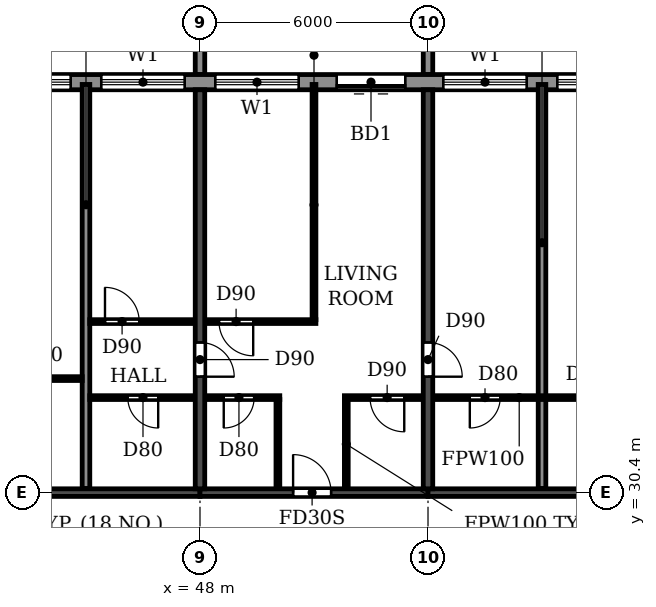
"""IFC4 building model, lengths in metres.
Left out: names, types, materials, properties, quantities, classifications, styles, units other than length and angle.
Written with IfcOpenShell. Run it as: python <this file> out.ifc"""

import sys

from ifc_helpers import new_model, si_unit, direction, frame, frame_2d, origin, place, context, subcontext, project, spatial, polyline, rectangle, outline, extrude, source, transform, mapped, element, fill, save


model = new_model("IFC4")
c1 = context("Model", 3, precision=1e-05, world=origin(), true_north=direction((0.0, 1.0)))
c2 = subcontext(c1, "Body", "Model", "MODEL_VIEW")
j1 = project(units=[si_unit("LENGTHUNIT", "METRE"), si_unit("PLANEANGLEUNIT", "RADIAN")], contexts=[c1])
p1 = place(None, origin())
s1 = spatial("IfcSite", under=j1, at=p1, CompositionType="ELEMENT")
p2 = place(p1, origin())
s2 = spatial("IfcBuilding", under=s1, at=p2, CompositionType="ELEMENT")
p3 = place(p2, frame((0.0, 0.0, 208.2)))
s3 = spatial("IfcBuildingStorey", under=s2, at=p3, CompositionType="ELEMENT", Elevation=208.2)
p4 = place(p3, frame((48.0, 30.5, 0.0), z_axis=(0.0, 0.0, 1.0), x_axis=(0.0, 1.0, 0.0)))
e1 = element("IfcWall", 1, at=p4, inside=s3, PredefinedType="SHEAR", context=c2, shape_type="SweptSolid", body=[
    extrude(rectangle(XDim=10.5, YDim=0.25, at=frame_2d((5.25, 0.0))), origin(), (0.0, 0.0, 1.0), 3.0),
])
p5 = place(p4, frame((2.95, 0.0, 0.0)))
e2 = element("IfcOpeningElement", 2, at=p5, cuts=e1, PredefinedType="OPENING", context=c2, shape_type="SweptSolid", body=[
    extrude(rectangle(XDim=0.9, YDim=2.1, at=frame_2d((0.45, 1.05))), frame((0.0, 0.135, 0.0), z_axis=(0.0, -1.0, 0.0), x_axis=(1.0, 0.0, 0.0)), (0.0, 0.0, 1.0), 0.27),
])
p6 = place(p3, frame((54.0, 30.5, 0.0), z_axis=(0.0, 0.0, 1.0), x_axis=(0.0, 1.0, 0.0)))
e3 = element("IfcWall", 3, at=p6, inside=s3, PredefinedType="SHEAR", context=c2, shape_type="SweptSolid", body=[
    extrude(rectangle(XDim=10.5, YDim=0.25, at=frame_2d((5.25, 0.0))), origin(), (0.0, 0.0, 1.0), 3.0),
])
p7 = place(p6, frame((2.95, 0.0, 0.0)))
e4 = element("IfcOpeningElement", 4, at=p7, cuts=e3, PredefinedType="OPENING", context=c2, shape_type="SweptSolid", body=[
    extrude(rectangle(XDim=0.9, YDim=2.1, at=frame_2d((0.45, 1.05))), frame((0.0, 0.135, 0.0), z_axis=(0.0, -1.0, 0.0), x_axis=(1.0, 0.0, 0.0)), (0.0, 0.0, 1.0), 0.27),
])
p8 = place(p3, frame((42.0, 30.4, 0.0), z_axis=(0.0, 0.0, 1.0), x_axis=(1.0, 0.0, 0.0)))
e5 = element("IfcWall", 5, at=p8, inside=s3, PredefinedType="SHEAR", context=c2, shape_type="SweptSolid", body=[
    extrude(rectangle(XDim=6.0, YDim=0.2, at=frame_2d((3.0, 0.0))), origin(), (0.0, 0.0, 1.0), 2.4),
])
p9 = place(p3, frame((48.0, 30.4, 0.0), z_axis=(0.0, 0.0, 1.0), x_axis=(1.0, 0.0, 0.0)))
e6 = element("IfcWall", 6, at=p9, inside=s3, PredefinedType="SHEAR", context=c2, shape_type="SweptSolid", body=[
    extrude(rectangle(XDim=6.0, YDim=0.2, at=frame_2d((3.0, 0.0))), origin(), (0.0, 0.0, 1.0), 2.4),
])
p10 = place(p9, frame((2.45, 0.0, 0.0)))
e7 = element("IfcOpeningElement", 7, at=p10, cuts=e6, PredefinedType="OPENING", context=c2, shape_type="SweptSolid", body=[
    extrude(rectangle(XDim=1.0, YDim=2.1, at=frame_2d((0.5, 1.05))), frame((0.0, 0.11, 0.0), z_axis=(0.0, -1.0, 0.0), x_axis=(1.0, 0.0, 0.0)), (0.0, 0.0, 1.0), 0.22),
])
p11 = place(p3, frame((54.0, 30.4, 0.0), z_axis=(0.0, 0.0, 1.0), x_axis=(1.0, 0.0, 0.0)))
e8 = element("IfcWall", 8, at=p11, inside=s3, PredefinedType="SHEAR", context=c2, shape_type="SweptSolid", body=[
    extrude(rectangle(XDim=6.0, YDim=0.2, at=frame_2d((3.0, 0.0))), origin(), (0.0, 0.0, 1.0), 2.4),
])
p12 = place(p3, frame((79.317, 41.2, 0.0), z_axis=(0.0, 0.0, 1.0), x_axis=(-1.0, 0.0, 0.0)))
e9 = element("IfcWall", 9, at=p12, inside=s3, PredefinedType="STANDARD", context=c2, shape_type="SweptSolid", body=[
    extrude(rectangle(XDim=56.634, YDim=0.4, at=frame_2d((28.317, 0.0))), origin(), (0.0, 0.0, 1.0), 3.0),
])
p13 = place(p12, frame((52.717, 0.0, 0.9)))
e10 = element("IfcOpeningElement", 10, at=p13, cuts=e9, PredefinedType="OPENING", context=c2, shape_type="SweptSolid", body=[
    extrude(rectangle(XDim=2.2, YDim=1.5, at=frame_2d((1.1, 0.75))), frame((0.0, 0.21, 0.0), z_axis=(0.0, -1.0, 0.0), x_axis=(1.0, 0.0, 0.0)), (0.0, 0.0, 1.0), 0.42),
])
p14 = place(p12, frame((49.917, 0.0, 0.0)))
e11 = element("IfcOpeningElement", 11, at=p14, cuts=e9, PredefinedType="OPENING", context=c2, shape_type="SweptSolid", body=[
    extrude(rectangle(XDim=1.8, YDim=2.4, at=frame_2d((0.9, 1.2))), frame((0.0, 0.21, 0.0), z_axis=(0.0, -1.0, 0.0), x_axis=(1.0, 0.0, 0.0)), (0.0, 0.0, 1.0), 0.42),
])
p15 = place(p12, frame((46.717, 0.0, 0.9)))
e12 = element("IfcOpeningElement", 12, at=p15, cuts=e9, PredefinedType="OPENING", context=c2, shape_type="SweptSolid", body=[
    extrude(rectangle(XDim=2.2, YDim=1.5, at=frame_2d((1.1, 0.75))), frame((0.0, 0.21, 0.0), z_axis=(0.0, -1.0, 0.0), x_axis=(1.0, 0.0, 0.0)), (0.0, 0.0, 1.0), 0.42),
])
p16 = place(p12, frame((43.917, 0.0, 0.0)))
e13 = element("IfcOpeningElement", 13, at=p16, cuts=e9, PredefinedType="OPENING", context=c2, shape_type="SweptSolid", body=[
    extrude(rectangle(XDim=1.8, YDim=2.4, at=frame_2d((0.9, 1.2))), frame((0.0, 0.21, 0.0), z_axis=(0.0, -1.0, 0.0), x_axis=(1.0, 0.0, 0.0)), (0.0, 0.0, 1.0), 0.42),
])
p17 = place(p12, frame((40.917, 0.0, 0.0)))
e14 = element("IfcOpeningElement", 14, at=p17, cuts=e9, PredefinedType="OPENING", context=c2, shape_type="SweptSolid", body=[
    extrude(rectangle(XDim=1.8, YDim=2.4, at=frame_2d((0.9, 1.2))), frame((0.0, 0.21, 0.0), z_axis=(0.0, -1.0, 0.0), x_axis=(1.0, 0.0, 0.0)), (0.0, 0.0, 1.0), 0.42),
])
p18 = place(p12, frame((37.717, 0.0, 0.9)))
e15 = element("IfcOpeningElement", 15, at=p18, cuts=e9, PredefinedType="OPENING", context=c2, shape_type="SweptSolid", body=[
    extrude(rectangle(XDim=2.2, YDim=1.5, at=frame_2d((1.1, 0.75))), frame((0.0, 0.21, 0.0), z_axis=(0.0, -1.0, 0.0), x_axis=(1.0, 0.0, 0.0)), (0.0, 0.0, 1.0), 0.42),
])
p19 = place(p12, frame((34.717, 0.0, 0.9)))
e16 = element("IfcOpeningElement", 16, at=p19, cuts=e9, PredefinedType="OPENING", context=c2, shape_type="SweptSolid", body=[
    extrude(rectangle(XDim=2.2, YDim=1.5, at=frame_2d((1.1, 0.75))), frame((0.0, 0.21, 0.0), z_axis=(0.0, -1.0, 0.0), x_axis=(1.0, 0.0, 0.0)), (0.0, 0.0, 1.0), 0.42),
])
p20 = place(p12, frame((31.717, 0.0, 0.9)))
e17 = element("IfcOpeningElement", 17, at=p20, cuts=e9, PredefinedType="OPENING", context=c2, shape_type="SweptSolid", body=[
    extrude(rectangle(XDim=2.2, YDim=1.5, at=frame_2d((1.1, 0.75))), frame((0.0, 0.21, 0.0), z_axis=(0.0, -1.0, 0.0), x_axis=(1.0, 0.0, 0.0)), (0.0, 0.0, 1.0), 0.42),
])
p21 = place(p12, frame((28.717, 0.0, 0.9)))
e18 = element("IfcOpeningElement", 18, at=p21, cuts=e9, PredefinedType="OPENING", context=c2, shape_type="SweptSolid", body=[
    extrude(rectangle(XDim=2.2, YDim=1.5, at=frame_2d((1.1, 0.75))), frame((0.0, 0.21, 0.0), z_axis=(0.0, -1.0, 0.0), x_axis=(1.0, 0.0, 0.0)), (0.0, 0.0, 1.0), 0.42),
])
p22 = place(p12, frame((25.917, 0.0, 0.0)))
e19 = element("IfcOpeningElement", 19, at=p22, cuts=e9, PredefinedType="OPENING", context=c2, shape_type="SweptSolid", body=[
    extrude(rectangle(XDim=1.8, YDim=2.4, at=frame_2d((0.9, 1.2))), frame((0.0, 0.21, 0.0), z_axis=(0.0, -1.0, 0.0), x_axis=(1.0, 0.0, 0.0)), (0.0, 0.0, 1.0), 0.42),
])
p23 = place(p12, frame((22.717, 0.0, 0.9)))
e20 = element("IfcOpeningElement", 20, at=p23, cuts=e9, PredefinedType="OPENING", context=c2, shape_type="SweptSolid", body=[
    extrude(rectangle(XDim=2.2, YDim=1.5, at=frame_2d((1.1, 0.75))), frame((0.0, 0.21, 0.0), z_axis=(0.0, -1.0, 0.0), x_axis=(1.0, 0.0, 0.0)), (0.0, 0.0, 1.0), 0.42),
])
p24 = place(p12, frame((19.717, 0.0, 0.9)))
e21 = element("IfcOpeningElement", 21, at=p24, cuts=e9, PredefinedType="OPENING", context=c2, shape_type="SweptSolid", body=[
    extrude(rectangle(XDim=2.2, YDim=1.5, at=frame_2d((1.1, 0.75))), frame((0.0, 0.21, 0.0), z_axis=(0.0, -1.0, 0.0), x_axis=(1.0, 0.0, 0.0)), (0.0, 0.0, 1.0), 0.42),
])
p25 = place(p12, frame((16.917, 0.0, 0.0)))
e22 = element("IfcOpeningElement", 22, at=p25, cuts=e9, PredefinedType="OPENING", context=c2, shape_type="SweptSolid", body=[
    extrude(rectangle(XDim=1.8, YDim=2.4, at=frame_2d((0.9, 1.2))), frame((0.0, 0.21, 0.0), z_axis=(0.0, -1.0, 0.0), x_axis=(1.0, 0.0, 0.0)), (0.0, 0.0, 1.0), 0.42),
])
p26 = place(p12, frame((13.717, 0.0, 0.9)))
e23 = element("IfcOpeningElement", 23, at=p26, cuts=e9, PredefinedType="OPENING", context=c2, shape_type="SweptSolid", body=[
    extrude(rectangle(XDim=2.2, YDim=1.5, at=frame_2d((1.1, 0.75))), frame((0.0, 0.21, 0.0), z_axis=(0.0, -1.0, 0.0), x_axis=(1.0, 0.0, 0.0)), (0.0, 0.0, 1.0), 0.42),
])
p27 = place(p12, frame((10.717, 0.0, 0.9)))
e24 = element("IfcOpeningElement", 24, at=p27, cuts=e9, PredefinedType="OPENING", context=c2, shape_type="SweptSolid", body=[
    extrude(rectangle(XDim=2.2, YDim=1.5, at=frame_2d((1.1, 0.75))), frame((0.0, 0.21, 0.0), z_axis=(0.0, -1.0, 0.0), x_axis=(1.0, 0.0, 0.0)), (0.0, 0.0, 1.0), 0.42),
])
p28 = place(p12, frame((7.717, 0.0, 0.9)))
e25 = element("IfcOpeningElement", 25, at=p28, cuts=e9, PredefinedType="OPENING", context=c2, shape_type="SweptSolid", body=[
    extrude(rectangle(XDim=2.2, YDim=1.5, at=frame_2d((1.1, 0.75))), frame((0.0, 0.21, 0.0), z_axis=(0.0, -1.0, 0.0), x_axis=(1.0, 0.0, 0.0)), (0.0, 0.0, 1.0), 0.42),
])
p29 = place(p12, frame((4.917, 0.0, 0.0)))
e26 = element("IfcOpeningElement", 26, at=p29, cuts=e9, PredefinedType="OPENING", context=c2, shape_type="SweptSolid", body=[
    extrude(rectangle(XDim=1.8, YDim=2.4, at=frame_2d((0.9, 1.2))), frame((0.0, 0.21, 0.0), z_axis=(0.0, -1.0, 0.0), x_axis=(1.0, 0.0, 0.0)), (0.0, 0.0, 1.0), 0.42),
])
p30 = place(p12, frame((1.717, 0.0, 0.9)))
e27 = element("IfcOpeningElement", 27, at=p30, cuts=e9, PredefinedType="OPENING", context=c2, shape_type="SweptSolid", body=[
    extrude(rectangle(XDim=2.2, YDim=1.5, at=frame_2d((1.1, 0.75))), frame((0.0, 0.21, 0.0), z_axis=(0.0, -1.0, 0.0), x_axis=(1.0, 0.0, 0.0)), (0.0, 0.0, 1.0), 0.42),
])
m1 = source(origin(), c2, "Body", "SweptSolid", [
    extrude(outline(polyline([(0.0, 0.0), (0.25, 0.0), (0.25, 3.1), (0.0, 3.1), (0.0, 0.0)])), origin(), (0.0, 0.0, 1.0), 3.1),
])
for number, where in (
    (28, (47.875, 41.4, 0.0)),
    (29, (53.875, 41.4, 0.0)),
):
    element("IfcWall", number, at=place(p3, frame(where)), inside=s3, PredefinedType="STANDARD", context=c2, shape_type="MappedRepresentation", body=[
        mapped(m1, transform((0.0, 0.0, 0.0))),
    ])
for number, where, z_axis, x_axis in (
    (30, (45.0, 30.51, 0.0), (0.0, 0.0, 1.0), (0.0, 1.0, 0.0)),
    (31, (57.0, 30.51, 0.0), (0.0, 0.0, 1.0), (0.0, 1.0, 0.0)),
):
    element("IfcWall", number, at=place(p3, frame(where, z_axis=z_axis, x_axis=x_axis)), inside=s3, PredefinedType="PARTITIONING", context=c2, shape_type="SweptSolid", body=[
        extrude(rectangle(XDim=10.63, YDim=0.2, at=frame_2d((5.315, 0.0))), origin(), (0.0, 0.0, 1.0), 3.0),
    ])
p31 = place(p3, frame((45.1, 32.9, 0.0), z_axis=(0.0, 0.0, 1.0), x_axis=(1.0, 0.0, 0.0)))
e32 = element("IfcWall", 32, at=p31, inside=s3, PredefinedType="PARTITIONING", context=c2, shape_type="SweptSolid", body=[
    extrude(rectangle(XDim=2.765, YDim=0.1, at=frame_2d((1.382, 0.0))), origin(), (0.0, 0.0, 1.0), 3.0),
])
p32 = place(p31, frame((1.0, 0.0, 0.0)))
e33 = element("IfcOpeningElement", 33, at=p32, cuts=e32, PredefinedType="OPENING", context=c2, shape_type="SweptSolid", body=[
    extrude(rectangle(XDim=0.8, YDim=2.1, at=frame_2d((0.4, 1.05))), frame((0.0, 0.06, 0.0), z_axis=(0.0, -1.0, 0.0), x_axis=(1.0, 0.0, 0.0)), (0.0, 0.0, 1.0), 0.12),
])
p33 = place(p3, frame((48.135, 32.9, 0.0), z_axis=(0.0, 0.0, 1.0), x_axis=(1.0, 0.0, 0.0)))
e34 = element("IfcWall", 34, at=p33, inside=s3, PredefinedType="PARTITIONING", context=c2, shape_type="SweptSolid", body=[
    extrude(rectangle(XDim=1.965, YDim=0.1, at=frame_2d((0.982, 0.0))), origin(), (0.0, 0.0, 1.0), 3.0),
])
p34 = place(p33, frame((0.49, 0.0, 0.0)))
e35 = element("IfcOpeningElement", 35, at=p34, cuts=e34, PredefinedType="OPENING", context=c2, shape_type="SweptSolid", body=[
    extrude(rectangle(XDim=0.8, YDim=2.1, at=frame_2d((0.4, 1.05))), frame((0.0, 0.06, 0.0), z_axis=(0.0, -1.0, 0.0), x_axis=(1.0, 0.0, 0.0)), (0.0, 0.0, 1.0), 0.12),
])
p35 = place(p3, frame((51.8, 32.9, 0.0), z_axis=(0.0, 0.0, 1.0), x_axis=(1.0, 0.0, 0.0)))
e36 = element("IfcWall", 36, at=p35, inside=s3, PredefinedType="PARTITIONING", context=c2, shape_type="SweptSolid", body=[
    extrude(rectangle(XDim=2.065, YDim=0.1, at=frame_2d((1.032, 0.0))), origin(), (0.0, 0.0, 1.0), 3.0),
])
p36 = place(p35, frame((0.675, 0.0, 0.0)))
e37 = element("IfcOpeningElement", 37, at=p36, cuts=e36, PredefinedType="OPENING", context=c2, shape_type="SweptSolid", body=[
    extrude(rectangle(XDim=0.9, YDim=2.1, at=frame_2d((0.45, 1.05))), frame((0.0, 0.06, 0.0), z_axis=(0.0, -1.0, 0.0), x_axis=(1.0, 0.0, 0.0)), (0.0, 0.0, 1.0), 0.12),
])
p37 = place(p3, frame((54.135, 32.9, 0.0), z_axis=(0.0, 0.0, 1.0), x_axis=(1.0, 0.0, 0.0)))
e38 = element("IfcWall", 38, at=p37, inside=s3, PredefinedType="PARTITIONING", context=c2, shape_type="SweptSolid", body=[
    extrude(rectangle(XDim=5.73, YDim=0.1, at=frame_2d((2.865, 0.0))), origin(), (0.0, 0.0, 1.0), 3.0),
])
p38 = place(p37, frame((0.965, 0.0, 0.0)))
e39 = element("IfcOpeningElement", 39, at=p38, cuts=e38, PredefinedType="OPENING", context=c2, shape_type="SweptSolid", body=[
    extrude(rectangle(XDim=0.8, YDim=2.1, at=frame_2d((0.4, 1.05))), frame((0.0, 0.06, 0.0), z_axis=(0.0, -1.0, 0.0), x_axis=(1.0, 0.0, 0.0)), (0.0, 0.0, 1.0), 0.12),
])
p39 = place(p37, frame((3.965, 0.0, 0.0)))
e40 = element("IfcOpeningElement", 40, at=p39, cuts=e38, PredefinedType="OPENING", context=c2, shape_type="SweptSolid", body=[
    extrude(rectangle(XDim=0.8, YDim=2.1, at=frame_2d((0.4, 1.05))), frame((0.0, 0.06, 0.0), z_axis=(0.0, -1.0, 0.0), x_axis=(1.0, 0.0, 0.0)), (0.0, 0.0, 1.0), 0.12),
])
p40 = place(p3, frame((42.135, 33.4, 0.0), z_axis=(0.0, 0.0, 1.0), x_axis=(1.0, 0.0, 0.0)))
e41 = element("IfcWall", 41, at=p40, inside=s3, PredefinedType="PARTITIONING", context=c2, shape_type="SweptSolid", body=[
    extrude(rectangle(XDim=2.765, YDim=0.1, at=frame_2d((1.382, 0.0))), origin(), (0.0, 0.0, 1.0), 3.0),
])
p41 = place(p40, frame((0.965, 0.0, 0.0)))
e42 = element("IfcOpeningElement", 42, at=p41, cuts=e41, PredefinedType="OPENING", context=c2, shape_type="SweptSolid", body=[
    extrude(rectangle(XDim=0.8, YDim=2.1, at=frame_2d((0.4, 1.05))), frame((0.0, 0.06, 0.0), z_axis=(0.0, -1.0, 0.0), x_axis=(1.0, 0.0, 0.0)), (0.0, 0.0, 1.0), 0.12),
])
p42 = place(p3, frame((45.1, 34.9, 0.0), z_axis=(0.0, 0.0, 1.0), x_axis=(1.0, 0.0, 0.0)))
e43 = element("IfcWall", 43, at=p42, inside=s3, PredefinedType="PARTITIONING", context=c2, shape_type="SweptSolid", body=[
    extrude(rectangle(XDim=2.765, YDim=0.1, at=frame_2d((1.382, 0.0))), origin(), (0.0, 0.0, 1.0), 3.0),
])
p43 = place(p42, frame((0.4, 0.0, 0.0)))
e44 = element("IfcOpeningElement", 44, at=p43, cuts=e43, PredefinedType="OPENING", context=c2, shape_type="SweptSolid", body=[
    extrude(rectangle(XDim=0.9, YDim=2.1, at=frame_2d((0.45, 1.05))), frame((0.0, 0.06, 0.0), z_axis=(0.0, -1.0, 0.0), x_axis=(1.0, 0.0, 0.0)), (0.0, 0.0, 1.0), 0.12),
])
p44 = place(p3, frame((48.135, 34.9, 0.0), z_axis=(0.0, 0.0, 1.0), x_axis=(1.0, 0.0, 0.0)))
e45 = element("IfcWall", 45, at=p44, inside=s3, PredefinedType="PARTITIONING", context=c2, shape_type="SweptSolid", body=[
    extrude(rectangle(XDim=2.915, YDim=0.1, at=frame_2d((1.458, 0.0))), origin(), (0.0, 0.0, 1.0), 3.0),
])
p45 = place(p44, frame((0.365, 0.0, 0.0)))
e46 = element("IfcOpeningElement", 46, at=p45, cuts=e45, PredefinedType="OPENING", context=c2, shape_type="SweptSolid", body=[
    extrude(rectangle(XDim=0.9, YDim=2.1, at=frame_2d((0.45, 1.05))), frame((0.0, 0.06, 0.0), z_axis=(0.0, -1.0, 0.0), x_axis=(1.0, 0.0, 0.0)), (0.0, 0.0, 1.0), 0.12),
])
p46 = place(p3, frame((50.05, 30.51, 0.0), z_axis=(0.0, 0.0, 1.0), x_axis=(0.0, 1.0, 0.0)))
e47 = element("IfcWall", 47, at=p46, inside=s3, PredefinedType="PARTITIONING", context=c2, shape_type="SweptSolid", body=[
    extrude(rectangle(XDim=2.34, YDim=0.1, at=frame_2d((1.17, 0.0))), origin(), (0.0, 0.0, 1.0), 3.0),
])
p47 = place(p3, frame((51.0, 34.95, 0.0), z_axis=(0.0, 0.0, 1.0), x_axis=(0.0, 1.0, 0.0)))
e48 = element("IfcWall", 48, at=p47, inside=s3, PredefinedType="PARTITIONING", context=c2, shape_type="SweptSolid", body=[
    extrude(rectangle(XDim=6.19, YDim=0.1, at=frame_2d((3.095, 0.0))), origin(), (0.0, 0.0, 1.0), 3.0),
])
p48 = place(p3, frame((51.85, 30.51, 0.0), z_axis=(0.0, 0.0, 1.0), x_axis=(0.0, 1.0, 0.0)))
e49 = element("IfcWall", 49, at=p48, inside=s3, PredefinedType="PARTITIONING", context=c2, shape_type="SweptSolid", body=[
    extrude(rectangle(XDim=2.34, YDim=0.1, at=frame_2d((1.17, 0.0))), origin(), (0.0, 0.0, 1.0), 3.0),
])
p49 = place(p19, origin())
e50 = element("IfcWindow", 50, at=p49, inside=s3, PartitioningType="DOUBLE_PANEL_HORIZONTAL", PredefinedType="WINDOW", context=c2, shape_type="SweptSolid", body=[
    extrude(rectangle(XDim=2.2, YDim=1.5, at=frame_2d((1.1, 0.75))), frame((0.0, 0.03, 0.0), z_axis=(0.0, -1.0, 0.0), x_axis=(1.0, 0.0, 0.0)), (0.0, 0.0, 1.0), 0.06),
])
fill(e16, e50)
p50 = place(p20, origin())
e51 = element("IfcWindow", 51, at=p50, inside=s3, PartitioningType="DOUBLE_PANEL_HORIZONTAL", PredefinedType="WINDOW", context=c2, shape_type="SweptSolid", body=[
    extrude(rectangle(XDim=2.2, YDim=1.5, at=frame_2d((1.1, 0.75))), frame((0.0, 0.03, 0.0), z_axis=(0.0, -1.0, 0.0), x_axis=(1.0, 0.0, 0.0)), (0.0, 0.0, 1.0), 0.06),
])
fill(e17, e51)
p51 = place(p21, origin())
e52 = element("IfcWindow", 52, at=p51, inside=s3, PartitioningType="DOUBLE_PANEL_HORIZONTAL", PredefinedType="WINDOW", context=c2, shape_type="SweptSolid", body=[
    extrude(rectangle(XDim=2.2, YDim=1.5, at=frame_2d((1.1, 0.75))), frame((0.0, 0.03, 0.0), z_axis=(0.0, -1.0, 0.0), x_axis=(1.0, 0.0, 0.0)), (0.0, 0.0, 1.0), 0.06),
])
fill(e18, e52)
p52 = place(p22, origin())
e53 = element("IfcDoor", 53, at=p52, inside=s3, OperationType="DOUBLE_DOOR_SLIDING", PredefinedType="DOOR", context=c2, shape_type="SweptSolid", body=[
    extrude(rectangle(XDim=1.8, YDim=2.4, at=frame_2d((0.9, 1.2))), frame((0.0, 0.025, 0.0), z_axis=(0.0, -1.0, 0.0), x_axis=(1.0, 0.0, 0.0)), (0.0, 0.0, 1.0), 0.05),
])
fill(e19, e53)
p53 = place(p23, origin())
e54 = element("IfcWindow", 54, at=p53, inside=s3, PartitioningType="DOUBLE_PANEL_HORIZONTAL", PredefinedType="WINDOW", context=c2, shape_type="SweptSolid", body=[
    extrude(rectangle(XDim=2.2, YDim=1.5, at=frame_2d((1.1, 0.75))), frame((0.0, 0.03, 0.0), z_axis=(0.0, -1.0, 0.0), x_axis=(1.0, 0.0, 0.0)), (0.0, 0.0, 1.0), 0.06),
])
fill(e20, e54)
p54 = place(p24, origin())
e55 = element("IfcWindow", 55, at=p54, inside=s3, PartitioningType="DOUBLE_PANEL_HORIZONTAL", PredefinedType="WINDOW", context=c2, shape_type="SweptSolid", body=[
    extrude(rectangle(XDim=2.2, YDim=1.5, at=frame_2d((1.1, 0.75))), frame((0.0, 0.03, 0.0), z_axis=(0.0, -1.0, 0.0), x_axis=(1.0, 0.0, 0.0)), (0.0, 0.0, 1.0), 0.06),
])
fill(e21, e55)
p55 = place(p38, frame((0.8, 0.0, 0.0), z_axis=(0.0, 0.0, 1.0), x_axis=(-1.0, 0.0, 0.0)))
e56 = element("IfcDoor", 56, at=p55, inside=s3, OperationType="SINGLE_SWING_RIGHT", PredefinedType="DOOR", context=c2, shape_type="SweptSolid", body=[
    extrude(rectangle(XDim=0.8, YDim=2.1, at=frame_2d((0.4, 1.05))), frame((0.0, 0.025, 0.0), z_axis=(0.0, -1.0, 0.0), x_axis=(1.0, 0.0, 0.0)), (0.0, 0.0, 1.0), 0.05),
])
fill(e39, e56)
p56 = place(p43, origin())
e57 = element("IfcDoor", 57, at=p56, inside=s3, OperationType="SINGLE_SWING_LEFT", PredefinedType="DOOR", context=c2, shape_type="SweptSolid", body=[
    extrude(rectangle(XDim=0.9, YDim=2.1, at=frame_2d((0.45, 1.05))), frame((0.0, 0.025, 0.0), z_axis=(0.0, -1.0, 0.0), x_axis=(1.0, 0.0, 0.0)), (0.0, 0.0, 1.0), 0.05),
])
fill(e44, e57)
p57 = place(p32, frame((0.8, 0.0, 0.0), z_axis=(0.0, 0.0, 1.0), x_axis=(-1.0, 0.0, 0.0)))
e58 = element("IfcDoor", 58, at=p57, inside=s3, OperationType="SINGLE_SWING_LEFT", PredefinedType="DOOR", context=c2, shape_type="SweptSolid", body=[
    extrude(rectangle(XDim=0.8, YDim=2.1, at=frame_2d((0.4, 1.05))), frame((0.0, 0.025, 0.0), z_axis=(0.0, -1.0, 0.0), x_axis=(1.0, 0.0, 0.0)), (0.0, 0.0, 1.0), 0.05),
])
fill(e33, e58)
p58 = place(p5, frame((0.9, 0.0, 0.0), z_axis=(0.0, 0.0, 1.0), x_axis=(-1.0, 0.0, 0.0)))
e59 = element("IfcDoor", 59, at=p58, inside=s3, OperationType="SINGLE_SWING_RIGHT", PredefinedType="DOOR", context=c2, shape_type="SweptSolid", body=[
    extrude(rectangle(XDim=0.9, YDim=2.1, at=frame_2d((0.45, 1.05))), frame((0.0, 0.025, 0.0), z_axis=(0.0, -1.0, 0.0), x_axis=(1.0, 0.0, 0.0)), (0.0, 0.0, 1.0), 0.05),
])
fill(e2, e59)
p59 = place(p45, frame((0.9, 0.0, 0.0), z_axis=(0.0, 0.0, 1.0), x_axis=(-1.0, 0.0, 0.0)))
e60 = element("IfcDoor", 60, at=p59, inside=s3, OperationType="SINGLE_SWING_LEFT", PredefinedType="DOOR", context=c2, shape_type="SweptSolid", body=[
    extrude(rectangle(XDim=0.9, YDim=2.1, at=frame_2d((0.45, 1.05))), frame((0.0, 0.025, 0.0), z_axis=(0.0, -1.0, 0.0), x_axis=(1.0, 0.0, 0.0)), (0.0, 0.0, 1.0), 0.05),
])
fill(e46, e60)
p60 = place(p34, frame((0.8, 0.0, 0.0), z_axis=(0.0, 0.0, 1.0), x_axis=(-1.0, 0.0, 0.0)))
e61 = element("IfcDoor", 61, at=p60, inside=s3, OperationType="SINGLE_SWING_RIGHT", PredefinedType="DOOR", context=c2, shape_type="SweptSolid", body=[
    extrude(rectangle(XDim=0.8, YDim=2.1, at=frame_2d((0.4, 1.05))), frame((0.0, 0.025, 0.0), z_axis=(0.0, -1.0, 0.0), x_axis=(1.0, 0.0, 0.0)), (0.0, 0.0, 1.0), 0.05),
])
fill(e35, e61)
p61 = place(p10, origin())
e62 = element("IfcDoor", 62, at=p61, inside=s3, OperationType="SINGLE_SWING_LEFT", PredefinedType="DOOR", context=c2, shape_type="SweptSolid", body=[
    extrude(rectangle(XDim=1.0, YDim=2.1, at=frame_2d((0.5, 1.05))), frame((0.0, 0.025, 0.0), z_axis=(0.0, -1.0, 0.0), x_axis=(1.0, 0.0, 0.0)), (0.0, 0.0, 1.0), 0.05),
])
fill(e7, e62)
p62 = place(p36, frame((0.9, 0.0, 0.0), z_axis=(0.0, 0.0, 1.0), x_axis=(-1.0, 0.0, 0.0)))
e63 = element("IfcDoor", 63, at=p62, inside=s3, OperationType="SINGLE_SWING_LEFT", PredefinedType="DOOR", context=c2, shape_type="SweptSolid", body=[
    extrude(rectangle(XDim=0.9, YDim=2.1, at=frame_2d((0.45, 1.05))), frame((0.0, 0.025, 0.0), z_axis=(0.0, -1.0, 0.0), x_axis=(1.0, 0.0, 0.0)), (0.0, 0.0, 1.0), 0.05),
])
fill(e37, e63)
p63 = place(p7, frame((0.9, 0.0, 0.0), z_axis=(0.0, 0.0, 1.0), x_axis=(-1.0, 0.0, 0.0)))
e64 = element("IfcDoor", 64, at=p63, inside=s3, OperationType="SINGLE_SWING_RIGHT", PredefinedType="DOOR", context=c2, shape_type="SweptSolid", body=[
    extrude(rectangle(XDim=0.9, YDim=2.1, at=frame_2d((0.45, 1.05))), frame((0.0, 0.025, 0.0), z_axis=(0.0, -1.0, 0.0), x_axis=(1.0, 0.0, 0.0)), (0.0, 0.0, 1.0), 0.05),
])
fill(e4, e64)
save(model, sys.argv[1])
